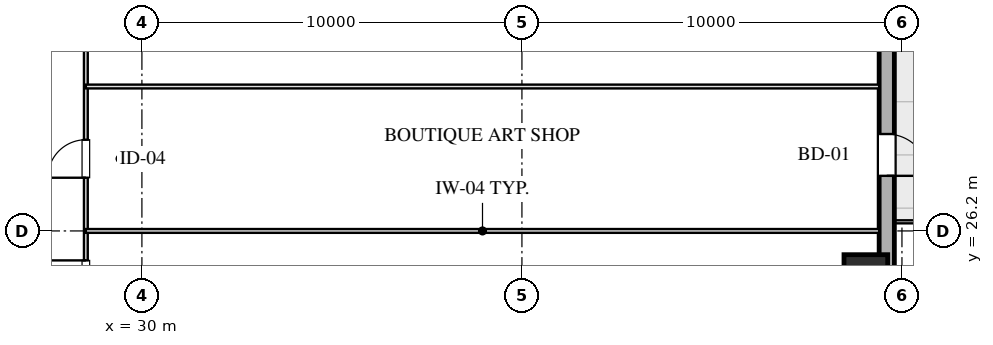
"""IFC4 building model, lengths in metres.
Left out: names, types, materials, properties, quantities, classifications, styles, units other than length and angle.
Written with IfcOpenShell. Run it as: python <this file> out.ifc"""

import sys

from ifc_helpers import new_model, si_unit, direction, frame, frame_2d, origin, origin_2d, place, context, subcontext, project, spatial, rectangle, hollow_rectangle, extrude, element, fill, save


model = new_model("IFC4")
c1 = context("Model", 3, precision=1e-05, world=origin(), true_north=direction((0.0, 1.0)))
c2 = subcontext(c1, "Body", "Model", "MODEL_VIEW")
j1 = project(units=[si_unit("LENGTHUNIT", "METRE"), si_unit("PLANEANGLEUNIT", "RADIAN")], contexts=[c1])
p1 = place(None, origin())
s1 = spatial("IfcSite", under=j1, at=p1, CompositionType="ELEMENT")
p2 = place(p1, origin())
s2 = spatial("IfcBuilding", under=s1, at=p2, CompositionType="ELEMENT")
p3 = place(p2, frame((0.0, 0.0, 81.65)))
s3 = spatial("IfcBuildingStorey", under=s2, at=p3, CompositionType="ELEMENT", Elevation=81.65)
p4 = place(p3, frame((49.05, 25.0, 0.0), z_axis=(0.0, 0.0, 1.0), x_axis=(1.0, 0.0, 0.0)))
e1 = element("IfcColumn", 1, at=p4, inside=s3, PredefinedType="COLUMN", context=c2, shape_type="SweptSolid", body=[
    extrude(hollow_rectangle(XDim=1.15, YDim=1.15, WallThickness=0.04, at=origin_2d()), origin(), (0.0, 0.0, 1.0), 3.451),
])
p5 = place(p3, frame((49.6, 60.8, 0.0), z_axis=(0.0, 0.0, 1.0), x_axis=(0.0, -1.0, 0.0)))
e2 = element("IfcWall", 2, at=p5, inside=s3, PredefinedType="SOLIDWALL", context=c2, shape_type="SweptSolid", body=[
    extrude(rectangle(XDim=53.6, YDim=0.4, at=frame_2d((26.8, 0.0))), origin(), (0.0, 0.0, 1.0), 2.61),
])
p6 = place(p5, frame((32.05, 0.0, 0.0)))
e3 = element("IfcOpeningElement", 3, at=p6, cuts=e2, PredefinedType="OPENING", context=c2, shape_type="SweptSolid", body=[
    extrude(rectangle(XDim=1.1, YDim=2.15, at=frame_2d((0.55, 1.075))), frame((0.0, 0.21, 0.0), z_axis=(0.0, -1.0, 0.0), x_axis=(1.0, 0.0, 0.0)), (0.0, 0.0, 1.0), 0.42),
])
p7 = place(p3, frame((28.525, 23.65, 0.0), z_axis=(0.0, 0.0, 1.0), x_axis=(0.0, 1.0, 0.0)))
e4 = element("IfcWall", 4, at=p7, inside=s3, PredefinedType="MOVABLE", context=c2, shape_type="SweptSolid", body=[
    extrude(rectangle(XDim=20.7, YDim=0.1, at=frame_2d((10.35, 0.0))), origin(), (0.0, 0.0, 1.0), 3.175),
])
p8 = place(p7, frame((0.775, 0.0, 0.0)))
e5 = element("IfcOpeningElement", 5, at=p8, cuts=e4, PredefinedType="OPENING", context=c2, shape_type="SweptSolid", body=[
    extrude(rectangle(XDim=1.0, YDim=2.05, at=frame_2d((0.5, 1.025))), frame((0.0, 0.06, 0.0), z_axis=(0.0, -1.0, 0.0), x_axis=(1.0, 0.0, 0.0)), (0.0, 0.0, 1.0), 0.12),
])
p9 = place(p7, frame((3.95, 0.0, 0.0)))
e6 = element("IfcOpeningElement", 6, at=p9, cuts=e4, PredefinedType="OPENING", context=c2, shape_type="SweptSolid", body=[
    extrude(rectangle(XDim=1.0, YDim=2.05, at=frame_2d((0.5, 1.025))), frame((0.0, 0.06, 0.0), z_axis=(0.0, -1.0, 0.0), x_axis=(1.0, 0.0, 0.0)), (0.0, 0.0, 1.0), 0.12),
])
p10 = place(p7, frame((7.51, 0.0, 0.0)))
e7 = element("IfcOpeningElement", 7, at=p10, cuts=e4, PredefinedType="OPENING", context=c2, shape_type="SweptSolid", body=[
    extrude(rectangle(XDim=1.05, YDim=2.05, at=frame_2d((0.525, 1.025))), frame((0.0, 0.06, 0.0), z_axis=(0.0, -1.0, 0.0), x_axis=(1.0, 0.0, 0.0)), (0.0, 0.0, 1.0), 0.12),
])
p11 = place(p7, frame((11.51, 0.0, 0.0)))
e8 = element("IfcOpeningElement", 8, at=p11, cuts=e4, PredefinedType="OPENING", context=c2, shape_type="SweptSolid", body=[
    extrude(rectangle(XDim=1.0, YDim=2.05, at=frame_2d((0.5, 1.025))), frame((0.0, 0.06, 0.0), z_axis=(0.0, -1.0, 0.0), x_axis=(1.0, 0.0, 0.0)), (0.0, 0.0, 1.0), 0.12),
])
p12 = place(p7, frame((15.75, 0.0, 0.0)))
e9 = element("IfcOpeningElement", 9, at=p12, cuts=e4, PredefinedType="OPENING", context=c2, shape_type="SweptSolid", body=[
    extrude(rectangle(XDim=1.0, YDim=2.05, at=frame_2d((0.5, 1.025))), frame((0.0, 0.06, 0.0), z_axis=(0.0, -1.0, 0.0), x_axis=(1.0, 0.0, 0.0)), (0.0, 0.0, 1.0), 0.12),
])
p13 = place(p7, frame((19.185, 0.0, 0.0)))
e10 = element("IfcOpeningElement", 10, at=p13, cuts=e4, PredefinedType="OPENING", context=c2, shape_type="SweptSolid", body=[
    extrude(rectangle(XDim=1.0, YDim=2.05, at=frame_2d((0.5, 1.025))), frame((0.0, 0.06, 0.0), z_axis=(0.0, -1.0, 0.0), x_axis=(1.0, 0.0, 0.0)), (0.0, 0.0, 1.0), 0.12),
])
for number, where, z_axis, x_axis in (
    (11, (28.525, 26.2, 0.0), (0.0, 0.0, 1.0), (1.0, 0.0, 0.0)),
    (12, (28.525, 30.0, 0.0), (0.0, 0.0, 1.0), (1.0, 0.0, 0.0)),
):
    element("IfcWall", number, at=place(p3, frame(where, z_axis=z_axis, x_axis=x_axis)), inside=s3, PredefinedType="MOVABLE", context=c2, shape_type="SweptSolid", body=[
        extrude(rectangle(XDim=20.875, YDim=0.1, at=frame_2d((10.438, 0.0))), origin(), (0.0, 0.0, 1.0), 3.175),
    ])
p14 = place(p6, origin())
e13 = element("IfcDoor", 13, at=p14, inside=s3, OperationType="SINGLE_SWING_RIGHT", PredefinedType="DOOR", context=c2, shape_type="SweptSolid", body=[
    extrude(rectangle(XDim=1.1, YDim=2.15, at=frame_2d((0.55, 1.075))), frame((0.0, 0.025, 0.0), z_axis=(0.0, -1.0, 0.0), x_axis=(1.0, 0.0, 0.0)), (0.0, 0.0, 1.0), 0.05),
])
fill(e3, e13)
p15 = place(p8, origin())
e14 = element("IfcDoor", 14, at=p15, inside=s3, OperationType="SINGLE_SWING_RIGHT", PredefinedType="DOOR", context=c2, shape_type="SweptSolid", body=[
    extrude(rectangle(XDim=1.0, YDim=2.05, at=frame_2d((0.5, 1.025))), frame((0.0, 0.025, 0.0), z_axis=(0.0, -1.0, 0.0), x_axis=(1.0, 0.0, 0.0)), (0.0, 0.0, 1.0), 0.05),
])
fill(e5, e14)
p16 = place(p9, origin())
e15 = element("IfcDoor", 15, at=p16, inside=s3, OperationType="SINGLE_SWING_LEFT", PredefinedType="DOOR", context=c2, shape_type="SweptSolid", body=[
    extrude(rectangle(XDim=1.0, YDim=2.05, at=frame_2d((0.5, 1.025))), frame((0.0, 0.025, 0.0), z_axis=(0.0, -1.0, 0.0), x_axis=(1.0, 0.0, 0.0)), (0.0, 0.0, 1.0), 0.05),
])
fill(e6, e15)
save(model, sys.argv[1])
